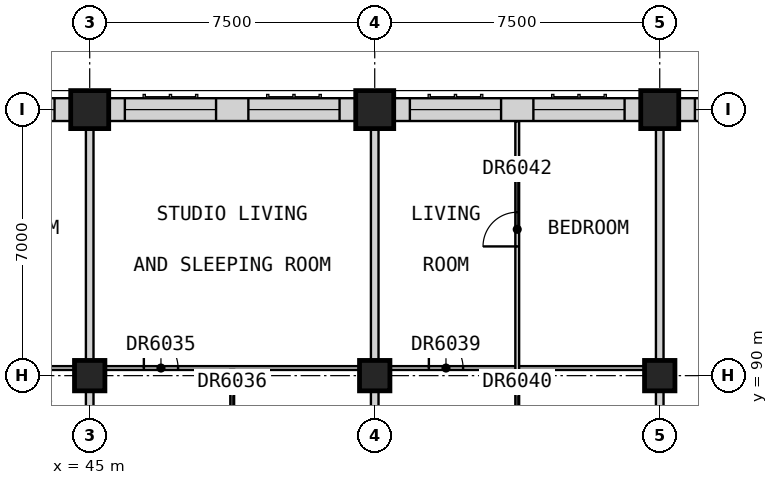
"""IFC4 building model, lengths in metres.
Left out: names, types, materials, properties, quantities, classifications, styles, units other than length and angle.
Written with IfcOpenShell. Run it as: python <this file> out.ifc"""

import sys

from ifc_helpers import new_model, si_unit, direction, frame, frame_2d, origin, origin_2d, place, context, subcontext, project, spatial, rectangle, extrude, element, fill, save


model = new_model("IFC4")
c1 = context("Model", 3, precision=1e-05, world=origin(), true_north=direction((0.0, 1.0)))
c2 = subcontext(c1, "Body", "Model", "MODEL_VIEW")
j1 = project(units=[si_unit("LENGTHUNIT", "METRE"), si_unit("PLANEANGLEUNIT", "RADIAN")], contexts=[c1])
p1 = place(None, origin())
s1 = spatial("IfcSite", under=j1, at=p1, CompositionType="ELEMENT")
p2 = place(p1, origin())
s2 = spatial("IfcBuilding", under=s1, at=p2, CompositionType="ELEMENT")
p3 = place(p2, frame((0.0, 0.0, 226.7)))
s3 = spatial("IfcBuildingStorey", under=s2, at=p3, CompositionType="ELEMENT", Elevation=226.7)
p4 = place(p3, frame((45.0, 90.0, 0.0), z_axis=(0.0, 0.0, 1.0), x_axis=(1.0, 0.0, 0.0)))
e1 = element("IfcColumn", 1, at=p4, inside=s3, PredefinedType="COLUMN", context=c2, shape_type="SweptSolid", body=[
    extrude(rectangle(XDim=0.8, YDim=0.8, at=origin_2d()), origin(), (0.0, 0.0, 1.0), 3.5),
])
p5 = place(p3, frame((45.0, 97.0, 0.0), z_axis=(0.0, 0.0, 1.0), x_axis=(1.0, 0.0, 0.0)))
e2 = element("IfcColumn", 2, at=p5, inside=s3, PredefinedType="COLUMN", context=c2, shape_type="SweptSolid", body=[
    extrude(rectangle(XDim=1.0, YDim=1.0, at=origin_2d()), origin(), (0.0, 0.0, 1.0), 3.5),
])
p6 = place(p3, frame((52.5, 90.0, 0.0), z_axis=(0.0, 0.0, 1.0), x_axis=(1.0, 0.0, 0.0)))
e3 = element("IfcColumn", 3, at=p6, inside=s3, PredefinedType="COLUMN", context=c2, shape_type="SweptSolid", body=[
    extrude(rectangle(XDim=0.8, YDim=0.8, at=origin_2d()), origin(), (0.0, 0.0, 1.0), 3.5),
])
p7 = place(p3, frame((52.5, 97.0, 0.0), z_axis=(0.0, 0.0, 1.0), x_axis=(1.0, 0.0, 0.0)))
e4 = element("IfcColumn", 4, at=p7, inside=s3, PredefinedType="COLUMN", context=c2, shape_type="SweptSolid", body=[
    extrude(rectangle(XDim=1.0, YDim=1.0, at=origin_2d()), origin(), (0.0, 0.0, 1.0), 3.5),
])
p8 = place(p3, frame((60.0, 90.0, 0.0), z_axis=(0.0, 0.0, 1.0), x_axis=(1.0, 0.0, 0.0)))
e5 = element("IfcColumn", 5, at=p8, inside=s3, PredefinedType="COLUMN", context=c2, shape_type="SweptSolid", body=[
    extrude(rectangle(XDim=0.8, YDim=0.8, at=origin_2d()), origin(), (0.0, 0.0, 1.0), 3.5),
])
p9 = place(p3, frame((60.0, 97.0, 0.0), z_axis=(0.0, 0.0, 1.0), x_axis=(1.0, 0.0, 0.0)))
e6 = element("IfcColumn", 6, at=p9, inside=s3, PredefinedType="COLUMN", context=c2, shape_type="SweptSolid", body=[
    extrude(rectangle(XDim=1.0, YDim=1.0, at=origin_2d()), origin(), (0.0, 0.0, 1.0), 3.5),
])
p10 = place(p3, frame((67.0, 97.0, 0.0), z_axis=(0.0, 0.0, 1.0), x_axis=(-1.0, 0.0, 0.0)))
e7 = element("IfcWall", 7, at=p10, inside=s3, PredefinedType="SOLIDWALL", context=c2, shape_type="SweptSolid", body=[
    extrude(rectangle(XDim=6.5, YDim=0.6, at=frame_2d((3.25, 0.0))), origin(), (0.0, 0.0, 1.0), 2.75),
])
p11 = place(p10, frame((3.675, 0.0, 0.8)))
e8 = element("IfcOpeningElement", 8, at=p11, cuts=e7, PredefinedType="OPENING", context=c2, shape_type="SweptSolid", body=[
    extrude(rectangle(XDim=2.4, YDim=1.8, at=frame_2d((1.2, 0.9))), frame((0.0, 0.31, 0.0), z_axis=(0.0, -1.0, 0.0), x_axis=(1.0, 0.0, 0.0)), (0.0, 0.0, 1.0), 0.62),
])
p12 = place(p10, frame((0.425, 0.0, 0.8)))
e9 = element("IfcOpeningElement", 9, at=p12, cuts=e7, PredefinedType="OPENING", context=c2, shape_type="SweptSolid", body=[
    extrude(rectangle(XDim=2.4, YDim=1.8, at=frame_2d((1.2, 0.9))), frame((0.0, 0.31, 0.0), z_axis=(0.0, -1.0, 0.0), x_axis=(1.0, 0.0, 0.0)), (0.0, 0.0, 1.0), 0.62),
])
p13 = place(p3, frame((59.5, 97.0, 0.0), z_axis=(0.0, 0.0, 1.0), x_axis=(-1.0, 0.0, 0.0)))
e10 = element("IfcWall", 10, at=p13, inside=s3, PredefinedType="SOLIDWALL", context=c2, shape_type="SweptSolid", body=[
    extrude(rectangle(XDim=6.5, YDim=0.6, at=frame_2d((3.25, 0.0))), origin(), (0.0, 0.0, 1.0), 2.75),
])
p14 = place(p13, frame((3.675, 0.0, 0.8)))
e11 = element("IfcOpeningElement", 11, at=p14, cuts=e10, PredefinedType="OPENING", context=c2, shape_type="SweptSolid", body=[
    extrude(rectangle(XDim=2.4, YDim=1.8, at=frame_2d((1.2, 0.9))), frame((0.0, 0.31, 0.0), z_axis=(0.0, -1.0, 0.0), x_axis=(1.0, 0.0, 0.0)), (0.0, 0.0, 1.0), 0.62),
])
p15 = place(p13, frame((0.425, 0.0, 0.8)))
e12 = element("IfcOpeningElement", 12, at=p15, cuts=e10, PredefinedType="OPENING", context=c2, shape_type="SweptSolid", body=[
    extrude(rectangle(XDim=2.4, YDim=1.8, at=frame_2d((1.2, 0.9))), frame((0.0, 0.31, 0.0), z_axis=(0.0, -1.0, 0.0), x_axis=(1.0, 0.0, 0.0)), (0.0, 0.0, 1.0), 0.62),
])
p16 = place(p3, frame((52.0, 97.0, 0.0), z_axis=(0.0, 0.0, 1.0), x_axis=(-1.0, 0.0, 0.0)))
e13 = element("IfcWall", 13, at=p16, inside=s3, PredefinedType="SOLIDWALL", context=c2, shape_type="SweptSolid", body=[
    extrude(rectangle(XDim=6.5, YDim=0.6, at=frame_2d((3.25, 0.0))), origin(), (0.0, 0.0, 1.0), 2.75),
])
p17 = place(p16, frame((3.675, 0.0, 0.8)))
e14 = element("IfcOpeningElement", 14, at=p17, cuts=e13, PredefinedType="OPENING", context=c2, shape_type="SweptSolid", body=[
    extrude(rectangle(XDim=2.4, YDim=1.8, at=frame_2d((1.2, 0.9))), frame((0.0, 0.31, 0.0), z_axis=(0.0, -1.0, 0.0), x_axis=(1.0, 0.0, 0.0)), (0.0, 0.0, 1.0), 0.62),
])
p18 = place(p16, frame((0.425, 0.0, 0.8)))
e15 = element("IfcOpeningElement", 15, at=p18, cuts=e13, PredefinedType="OPENING", context=c2, shape_type="SweptSolid", body=[
    extrude(rectangle(XDim=2.4, YDim=1.8, at=frame_2d((1.2, 0.9))), frame((0.0, 0.31, 0.0), z_axis=(0.0, -1.0, 0.0), x_axis=(1.0, 0.0, 0.0)), (0.0, 0.0, 1.0), 0.62),
])
p19 = place(p3, frame((44.5, 97.0, 0.0), z_axis=(0.0, 0.0, 1.0), x_axis=(-1.0, 0.0, 0.0)))
e16 = element("IfcWall", 16, at=p19, inside=s3, PredefinedType="SOLIDWALL", context=c2, shape_type="SweptSolid", body=[
    extrude(rectangle(XDim=6.5, YDim=0.6, at=frame_2d((3.25, 0.0))), origin(), (0.0, 0.0, 1.0), 2.75),
])
p20 = place(p19, frame((3.675, 0.0, 0.8)))
e17 = element("IfcOpeningElement", 17, at=p20, cuts=e16, PredefinedType="OPENING", context=c2, shape_type="SweptSolid", body=[
    extrude(rectangle(XDim=2.4, YDim=1.8, at=frame_2d((1.2, 0.9))), frame((0.0, 0.31, 0.0), z_axis=(0.0, -1.0, 0.0), x_axis=(1.0, 0.0, 0.0)), (0.0, 0.0, 1.0), 0.62),
])
p21 = place(p19, frame((0.425, 0.0, 0.8)))
e18 = element("IfcOpeningElement", 18, at=p21, cuts=e16, PredefinedType="OPENING", context=c2, shape_type="SweptSolid", body=[
    extrude(rectangle(XDim=2.4, YDim=1.8, at=frame_2d((1.2, 0.9))), frame((0.0, 0.31, 0.0), z_axis=(0.0, -1.0, 0.0), x_axis=(1.0, 0.0, 0.0)), (0.0, 0.0, 1.0), 0.62),
])
for number, where, z_axis, x_axis in (
    (19, (45.0, 84.375, 0.0), (0.0, 0.0, 1.0), (0.0, 1.0, 0.0)),
    (20, (52.5, 84.375, 0.0), (0.0, 0.0, 1.0), (0.0, 1.0, 0.0)),
    (21, (60.0, 84.375, 0.0), (0.0, 0.0, 1.0), (0.0, 1.0, 0.0)),
):
    element("IfcWall", number, at=place(p3, frame(where, z_axis=z_axis, x_axis=x_axis)), inside=s3, PredefinedType="PARTITIONING", context=c2, shape_type="SweptSolid", body=[
        extrude(rectangle(XDim=13.125, YDim=0.2, at=frame_2d((6.562, 0.0))), origin(), (0.0, 0.0, 1.0), 3.25),
    ])
p22 = place(p3, frame((30.0, 90.2, 0.0), z_axis=(0.0, 0.0, 1.0), x_axis=(1.0, 0.0, 0.0)))
e22 = element("IfcWall", 22, at=p22, inside=s3, PredefinedType="PARTITIONING", context=c2, shape_type="SweptSolid", body=[
    extrude(rectangle(XDim=29.9, YDim=0.1, at=frame_2d((14.95, 0.0))), origin(), (0.0, 0.0, 1.0), 2.75),
])
p23 = place(p22, frame((1.425, 0.0, 0.0)))
e23 = element("IfcOpeningElement", 23, at=p23, cuts=e22, PredefinedType="OPENING", context=c2, shape_type="SweptSolid", body=[
    extrude(rectangle(XDim=0.9, YDim=2.1, at=frame_2d((0.45, 1.05))), frame((0.0, 0.06, 0.0), z_axis=(0.0, -1.0, 0.0), x_axis=(1.0, 0.0, 0.0)), (0.0, 0.0, 1.0), 0.12),
])
p24 = place(p22, frame((8.925, 0.0, 0.0)))
e24 = element("IfcOpeningElement", 24, at=p24, cuts=e22, PredefinedType="OPENING", context=c2, shape_type="SweptSolid", body=[
    extrude(rectangle(XDim=0.9, YDim=2.1, at=frame_2d((0.45, 1.05))), frame((0.0, 0.06, 0.0), z_axis=(0.0, -1.0, 0.0), x_axis=(1.0, 0.0, 0.0)), (0.0, 0.0, 1.0), 0.12),
])
p25 = place(p22, frame((12.675, 0.0, 0.0)))
e25 = element("IfcOpeningElement", 25, at=p25, cuts=e22, PredefinedType="OPENING", context=c2, shape_type="SweptSolid", body=[
    extrude(rectangle(XDim=0.9, YDim=2.1, at=frame_2d((0.45, 1.05))), frame((0.0, 0.06, 0.0), z_axis=(0.0, -1.0, 0.0), x_axis=(1.0, 0.0, 0.0)), (0.0, 0.0, 1.0), 0.12),
])
p26 = place(p22, frame((16.425, 0.0, 0.0)))
e26 = element("IfcOpeningElement", 26, at=p26, cuts=e22, PredefinedType="OPENING", context=c2, shape_type="SweptSolid", body=[
    extrude(rectangle(XDim=0.9, YDim=2.1, at=frame_2d((0.45, 1.05))), frame((0.0, 0.06, 0.0), z_axis=(0.0, -1.0, 0.0), x_axis=(1.0, 0.0, 0.0)), (0.0, 0.0, 1.0), 0.12),
])
p27 = place(p22, frame((23.925, 0.0, 0.0)))
e27 = element("IfcOpeningElement", 27, at=p27, cuts=e22, PredefinedType="OPENING", context=c2, shape_type="SweptSolid", body=[
    extrude(rectangle(XDim=0.9, YDim=2.1, at=frame_2d((0.45, 1.05))), frame((0.0, 0.06, 0.0), z_axis=(0.0, -1.0, 0.0), x_axis=(1.0, 0.0, 0.0)), (0.0, 0.0, 1.0), 0.12),
])
p28 = place(p3, frame((48.75, 87.312, 0.0), z_axis=(0.0, 0.0, 1.0), x_axis=(0.0, 1.0, 0.0)))
e28 = element("IfcWall", 28, at=p28, inside=s3, PredefinedType="PARTITIONING", context=c2, shape_type="SweptSolid", body=[
    extrude(rectangle(XDim=2.837, YDim=0.1, at=frame_2d((1.419, 0.0))), origin(), (0.0, 0.0, 1.0), 3.25),
])
p29 = place(p28, frame((0.962, 0.0, 0.0)))
e29 = element("IfcOpeningElement", 29, at=p29, cuts=e28, PredefinedType="OPENING", context=c2, shape_type="SweptSolid", body=[
    extrude(rectangle(XDim=0.9, YDim=2.1, at=frame_2d((0.45, 1.05))), frame((0.0, 0.06, 0.0), z_axis=(0.0, -1.0, 0.0), x_axis=(1.0, 0.0, 0.0)), (0.0, 0.0, 1.0), 0.12),
])
p30 = place(p3, frame((56.25, 87.312, 0.0), z_axis=(0.0, 0.0, 1.0), x_axis=(0.0, 1.0, 0.0)))
e30 = element("IfcWall", 30, at=p30, inside=s3, PredefinedType="PARTITIONING", context=c2, shape_type="SweptSolid", body=[
    extrude(rectangle(XDim=9.377, YDim=0.1, at=frame_2d((4.689, 0.0))), origin(), (0.0, 0.0, 1.0), 3.25),
])
p31 = place(p30, frame((0.962, 0.0, 0.0)))
e31 = element("IfcOpeningElement", 31, at=p31, cuts=e30, PredefinedType="OPENING", context=c2, shape_type="SweptSolid", body=[
    extrude(rectangle(XDim=0.9, YDim=2.1, at=frame_2d((0.45, 1.05))), frame((0.0, 0.06, 0.0), z_axis=(0.0, -1.0, 0.0), x_axis=(1.0, 0.0, 0.0)), (0.0, 0.0, 1.0), 0.12),
])
p32 = place(p30, frame((6.087, 0.0, 0.0)))
e32 = element("IfcOpeningElement", 32, at=p32, cuts=e30, PredefinedType="OPENING", context=c2, shape_type="SweptSolid", body=[
    extrude(rectangle(XDim=0.9, YDim=2.1, at=frame_2d((0.45, 1.05))), frame((0.0, 0.06, 0.0), z_axis=(0.0, -1.0, 0.0), x_axis=(1.0, 0.0, 0.0)), (0.0, 0.0, 1.0), 0.12),
])
p33 = place(p11, origin())
e33 = element("IfcWindow", 33, at=p33, inside=s3, PartitioningType="SINGLE_PANEL", PredefinedType="WINDOW", context=c2, shape_type="SweptSolid", body=[
    extrude(rectangle(XDim=2.4, YDim=1.8, at=frame_2d((1.2, 0.9))), frame((0.0, -0.07, 0.0), z_axis=(0.0, -1.0, 0.0), x_axis=(1.0, 0.0, 0.0)), (0.0, 0.0, 1.0), 0.06),
])
fill(e8, e33)
p34 = place(p14, origin())
e34 = element("IfcWindow", 34, at=p34, inside=s3, PartitioningType="SINGLE_PANEL", PredefinedType="WINDOW", context=c2, shape_type="SweptSolid", body=[
    extrude(rectangle(XDim=2.4, YDim=1.8, at=frame_2d((1.2, 0.9))), frame((0.0, -0.07, 0.0), z_axis=(0.0, -1.0, 0.0), x_axis=(1.0, 0.0, 0.0)), (0.0, 0.0, 1.0), 0.06),
])
fill(e11, e34)
p35 = place(p15, origin())
e35 = element("IfcWindow", 35, at=p35, inside=s3, PartitioningType="SINGLE_PANEL", PredefinedType="WINDOW", context=c2, shape_type="SweptSolid", body=[
    extrude(rectangle(XDim=2.4, YDim=1.8, at=frame_2d((1.2, 0.9))), frame((0.0, -0.07, 0.0), z_axis=(0.0, -1.0, 0.0), x_axis=(1.0, 0.0, 0.0)), (0.0, 0.0, 1.0), 0.06),
])
fill(e12, e35)
p36 = place(p17, origin())
e36 = element("IfcWindow", 36, at=p36, inside=s3, PartitioningType="SINGLE_PANEL", PredefinedType="WINDOW", context=c2, shape_type="SweptSolid", body=[
    extrude(rectangle(XDim=2.4, YDim=1.8, at=frame_2d((1.2, 0.9))), frame((0.0, -0.07, 0.0), z_axis=(0.0, -1.0, 0.0), x_axis=(1.0, 0.0, 0.0)), (0.0, 0.0, 1.0), 0.06),
])
fill(e14, e36)
p37 = place(p18, origin())
e37 = element("IfcWindow", 37, at=p37, inside=s3, PartitioningType="SINGLE_PANEL", PredefinedType="WINDOW", context=c2, shape_type="SweptSolid", body=[
    extrude(rectangle(XDim=2.4, YDim=1.8, at=frame_2d((1.2, 0.9))), frame((0.0, -0.07, 0.0), z_axis=(0.0, -1.0, 0.0), x_axis=(1.0, 0.0, 0.0)), (0.0, 0.0, 1.0), 0.06),
])
fill(e15, e37)
p38 = place(p21, origin())
e38 = element("IfcWindow", 38, at=p38, inside=s3, PartitioningType="SINGLE_PANEL", PredefinedType="WINDOW", context=c2, shape_type="SweptSolid", body=[
    extrude(rectangle(XDim=2.4, YDim=1.8, at=frame_2d((1.2, 0.9))), frame((0.0, -0.07, 0.0), z_axis=(0.0, -1.0, 0.0), x_axis=(1.0, 0.0, 0.0)), (0.0, 0.0, 1.0), 0.06),
])
fill(e18, e38)
p39 = place(p26, origin())
e39 = element("IfcDoor", 39, at=p39, inside=s3, OperationType="SINGLE_SWING_RIGHT", PredefinedType="DOOR", context=c2, shape_type="SweptSolid", body=[
    extrude(rectangle(XDim=0.9, YDim=2.1, at=frame_2d((0.45, 1.05))), frame((0.0, 0.025, 0.0), z_axis=(0.0, -1.0, 0.0), x_axis=(1.0, 0.0, 0.0)), (0.0, 0.0, 1.0), 0.05),
])
fill(e26, e39)
p40 = place(p27, origin())
e40 = element("IfcDoor", 40, at=p40, inside=s3, OperationType="SINGLE_SWING_RIGHT", PredefinedType="DOOR", context=c2, shape_type="SweptSolid", body=[
    extrude(rectangle(XDim=0.9, YDim=2.1, at=frame_2d((0.45, 1.05))), frame((0.0, 0.025, 0.0), z_axis=(0.0, -1.0, 0.0), x_axis=(1.0, 0.0, 0.0)), (0.0, 0.0, 1.0), 0.05),
])
fill(e27, e40)
p41 = place(p32, origin())
e41 = element("IfcDoor", 41, at=p41, inside=s3, OperationType="SINGLE_SWING_LEFT", PredefinedType="DOOR", context=c2, shape_type="SweptSolid", body=[
    extrude(rectangle(XDim=0.9, YDim=2.1, at=frame_2d((0.45, 1.05))), frame((0.0, 0.025, 0.0), z_axis=(0.0, -1.0, 0.0), x_axis=(1.0, 0.0, 0.0)), (0.0, 0.0, 1.0), 0.05),
])
fill(e32, e41)
save(model, sys.argv[1])
